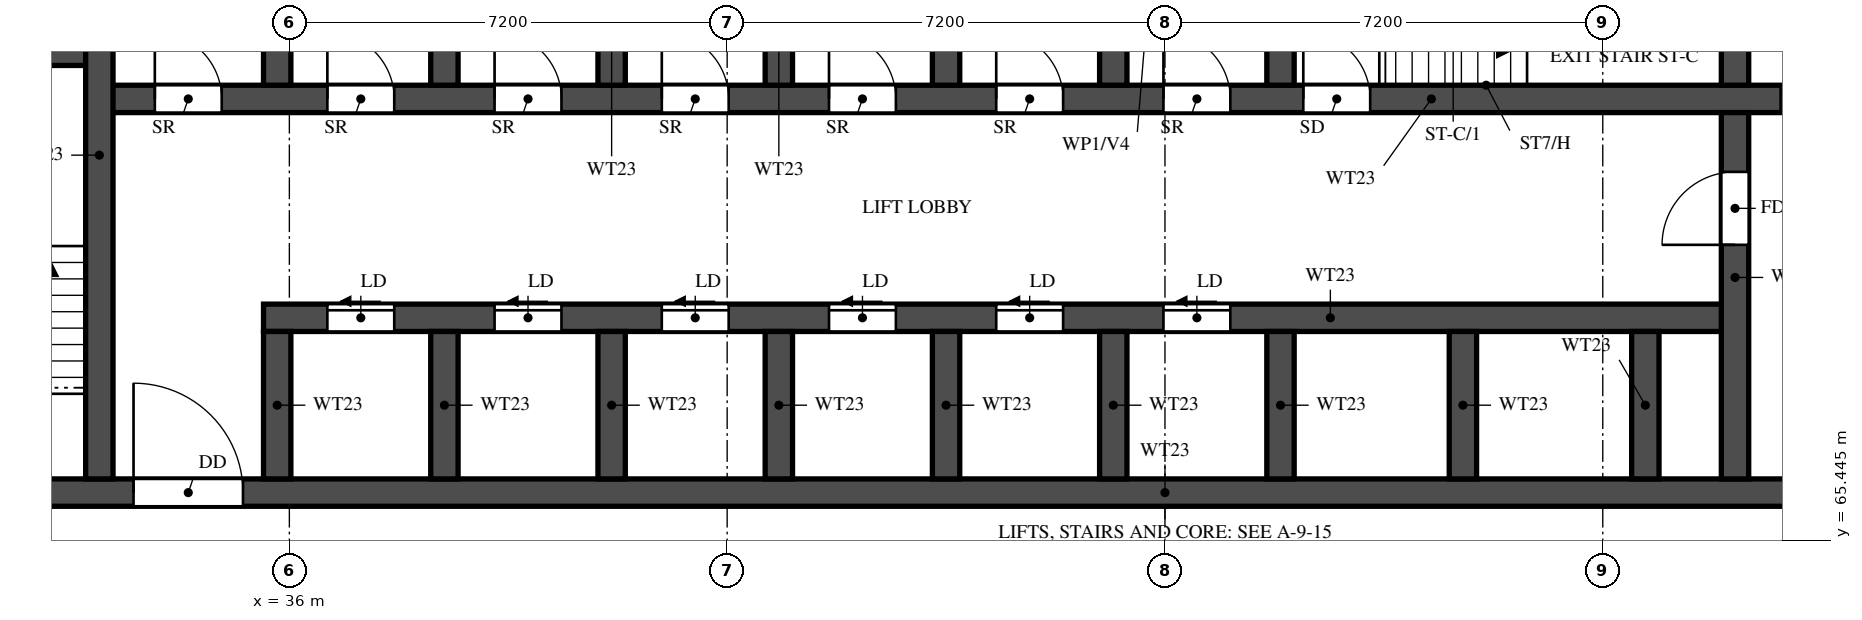
"""IFC4 building model, lengths in metres.
Left out: names, types, materials, properties, quantities, classifications, styles, units other than length and angle.
Written with IfcOpenShell. Run it as: python <this file> out.ifc"""

import sys

from ifc_helpers import new_model, si_unit, direction, frame, frame_2d, origin, place, context, subcontext, project, spatial, rectangle, extrude, element, fill, save


model = new_model("IFC4")
c1 = context("Model", 3, precision=1e-05, world=origin(), true_north=direction((0.0, 1.0)))
c2 = subcontext(c1, "Body", "Model", "MODEL_VIEW")
j1 = project(units=[si_unit("LENGTHUNIT", "METRE"), si_unit("PLANEANGLEUNIT", "RADIAN")], contexts=[c1])
p1 = place(None, origin())
s1 = spatial("IfcSite", under=j1, at=p1, CompositionType="ELEMENT")
p2 = place(p1, origin())
s2 = spatial("IfcBuilding", under=s1, at=p2, CompositionType="ELEMENT")
p3 = place(p2, frame((0.0, 0.0, 104.0)))
s3 = spatial("IfcBuildingStorey", under=s2, at=p3, CompositionType="ELEMENT", Elevation=104.0)
p4 = place(p3, frame((29.7, 66.225, 0.0), z_axis=(0.0, 0.0, 1.0), x_axis=(1.0, 0.0, 0.0)))
e1 = element("IfcWall", 1, at=p4, inside=s3, PredefinedType="SHEAR", context=c2, shape_type="SweptSolid", body=[
    extrude(rectangle(XDim=41.4, YDim=0.45, at=frame_2d((20.7, 0.0))), origin(), (0.0, 0.0, 1.0), 3.1),
])
p5 = place(p4, frame((0.925, 0.0, 0.0)))
e2 = element("IfcOpeningElement", 2, at=p5, cuts=e1, PredefinedType="OPENING", context=c2, shape_type="SweptSolid", body=[
    extrude(rectangle(XDim=1.1, YDim=2.1, at=frame_2d((0.55, 1.05))), frame((0.0, 0.235, 0.0), z_axis=(0.0, -1.0, 0.0), x_axis=(1.0, 0.0, 0.0)), (0.0, 0.0, 1.0), 0.47),
])
p6 = place(p4, frame((3.738, 0.0, 0.0)))
e3 = element("IfcOpeningElement", 3, at=p6, cuts=e1, PredefinedType="OPENING", context=c2, shape_type="SweptSolid", body=[
    extrude(rectangle(XDim=1.8, YDim=2.1, at=frame_2d((0.9, 1.05))), frame((0.0, 0.235, 0.0), z_axis=(0.0, -1.0, 0.0), x_axis=(1.0, 0.0, 0.0)), (0.0, 0.0, 1.0), 0.47),
])
p7 = place(p3, frame((35.575, 69.1, 0.0), z_axis=(0.0, 0.0, 1.0), x_axis=(1.0, 0.0, 0.0)))
e4 = element("IfcWall", 4, at=p7, inside=s3, PredefinedType="SHEAR", context=c2, shape_type="SweptSolid", body=[
    extrude(rectangle(XDim=24.2, YDim=0.45, at=frame_2d((12.1, 0.0))), origin(), (0.0, 0.0, 1.0), 3.1),
])
p8 = place(p7, frame((1.05, 0.0, 0.0)))
e5 = element("IfcOpeningElement", 5, at=p8, cuts=e4, PredefinedType="OPENING", context=c2, shape_type="SweptSolid", body=[
    extrude(rectangle(XDim=1.1, YDim=2.1, at=frame_2d((0.55, 1.05))), frame((0.0, 0.235, 0.0), z_axis=(0.0, -1.0, 0.0), x_axis=(1.0, 0.0, 0.0)), (0.0, 0.0, 1.0), 0.47),
])
p9 = place(p7, frame((3.8, 0.0, 0.0)))
e6 = element("IfcOpeningElement", 6, at=p9, cuts=e4, PredefinedType="OPENING", context=c2, shape_type="SweptSolid", body=[
    extrude(rectangle(XDim=1.1, YDim=2.1, at=frame_2d((0.55, 1.05))), frame((0.0, 0.235, 0.0), z_axis=(0.0, -1.0, 0.0), x_axis=(1.0, 0.0, 0.0)), (0.0, 0.0, 1.0), 0.47),
])
p10 = place(p7, frame((6.55, 0.0, 0.0)))
e7 = element("IfcOpeningElement", 7, at=p10, cuts=e4, PredefinedType="OPENING", context=c2, shape_type="SweptSolid", body=[
    extrude(rectangle(XDim=1.1, YDim=2.1, at=frame_2d((0.55, 1.05))), frame((0.0, 0.235, 0.0), z_axis=(0.0, -1.0, 0.0), x_axis=(1.0, 0.0, 0.0)), (0.0, 0.0, 1.0), 0.47),
])
p11 = place(p7, frame((9.3, 0.0, 0.0)))
e8 = element("IfcOpeningElement", 8, at=p11, cuts=e4, PredefinedType="OPENING", context=c2, shape_type="SweptSolid", body=[
    extrude(rectangle(XDim=1.1, YDim=2.1, at=frame_2d((0.55, 1.05))), frame((0.0, 0.235, 0.0), z_axis=(0.0, -1.0, 0.0), x_axis=(1.0, 0.0, 0.0)), (0.0, 0.0, 1.0), 0.47),
])
p12 = place(p7, frame((12.05, 0.0, 0.0)))
e9 = element("IfcOpeningElement", 9, at=p12, cuts=e4, PredefinedType="OPENING", context=c2, shape_type="SweptSolid", body=[
    extrude(rectangle(XDim=1.1, YDim=2.1, at=frame_2d((0.55, 1.05))), frame((0.0, 0.235, 0.0), z_axis=(0.0, -1.0, 0.0), x_axis=(1.0, 0.0, 0.0)), (0.0, 0.0, 1.0), 0.47),
])
p13 = place(p7, frame((14.8, 0.0, 0.0)))
e10 = element("IfcOpeningElement", 10, at=p13, cuts=e4, PredefinedType="OPENING", context=c2, shape_type="SweptSolid", body=[
    extrude(rectangle(XDim=1.1, YDim=2.1, at=frame_2d((0.55, 1.05))), frame((0.0, 0.235, 0.0), z_axis=(0.0, -1.0, 0.0), x_axis=(1.0, 0.0, 0.0)), (0.0, 0.0, 1.0), 0.47),
])
p14 = place(p3, frame((32.875, 72.7, 0.0), z_axis=(0.0, 0.0, 1.0), x_axis=(1.0, 0.0, 0.0)))
e11 = element("IfcWall", 11, at=p14, inside=s3, PredefinedType="SHEAR", context=c2, shape_type="SweptSolid", body=[
    extrude(rectangle(XDim=35.05, YDim=0.45, at=frame_2d((17.525, 0.0))), origin(), (0.0, 0.0, 1.0), 3.1),
])
p15 = place(p14, frame((19.8, 0.0, 0.0)))
e12 = element("IfcOpeningElement", 12, at=p15, cuts=e11, PredefinedType="OPENING", context=c2, shape_type="SweptSolid", body=[
    extrude(rectangle(XDim=1.1, YDim=2.1, at=frame_2d((0.55, 1.05))), frame((0.0, 0.235, 0.0), z_axis=(0.0, -1.0, 0.0), x_axis=(1.0, 0.0, 0.0)), (0.0, 0.0, 1.0), 0.47),
])
p16 = place(p14, frame((27.65, 0.0, 0.0)))
e13 = element("IfcOpeningElement", 13, at=p16, cuts=e11, PredefinedType="OPENING", context=c2, shape_type="SweptSolid", body=[
    extrude(rectangle(XDim=1.1, YDim=2.1, at=frame_2d((0.55, 1.05))), frame((0.0, 0.235, 0.0), z_axis=(0.0, -1.0, 0.0), x_axis=(1.0, 0.0, 0.0)), (0.0, 0.0, 1.0), 0.47),
])
p17 = place(p14, frame((30.25, 0.0, 0.0)))
e14 = element("IfcOpeningElement", 14, at=p17, cuts=e11, PredefinedType="OPENING", context=c2, shape_type="SweptSolid", body=[
    extrude(rectangle(XDim=1.1, YDim=2.1, at=frame_2d((0.55, 1.05))), frame((0.0, 0.235, 0.0), z_axis=(0.0, -1.0, 0.0), x_axis=(1.0, 0.0, 0.0)), (0.0, 0.0, 1.0), 0.47),
])
p18 = place(p14, frame((3.75, 0.0, 0.0)))
e15 = element("IfcOpeningElement", 15, at=p18, cuts=e11, PredefinedType="OPENING", context=c2, shape_type="SweptSolid", body=[
    extrude(rectangle(XDim=1.1, YDim=2.1, at=frame_2d((0.55, 1.05))), frame((0.0, 0.235, 0.0), z_axis=(0.0, -1.0, 0.0), x_axis=(1.0, 0.0, 0.0)), (0.0, 0.0, 1.0), 0.47),
])
p19 = place(p14, frame((6.5, 0.0, 0.0)))
e16 = element("IfcOpeningElement", 16, at=p19, cuts=e11, PredefinedType="OPENING", context=c2, shape_type="SweptSolid", body=[
    extrude(rectangle(XDim=1.1, YDim=2.1, at=frame_2d((0.55, 1.05))), frame((0.0, 0.235, 0.0), z_axis=(0.0, -1.0, 0.0), x_axis=(1.0, 0.0, 0.0)), (0.0, 0.0, 1.0), 0.47),
])
p20 = place(p14, frame((9.25, 0.0, 0.0)))
e17 = element("IfcOpeningElement", 17, at=p20, cuts=e11, PredefinedType="OPENING", context=c2, shape_type="SweptSolid", body=[
    extrude(rectangle(XDim=1.1, YDim=2.1, at=frame_2d((0.55, 1.05))), frame((0.0, 0.235, 0.0), z_axis=(0.0, -1.0, 0.0), x_axis=(1.0, 0.0, 0.0)), (0.0, 0.0, 1.0), 0.47),
])
p21 = place(p14, frame((12.0, 0.0, 0.0)))
e18 = element("IfcOpeningElement", 18, at=p21, cuts=e11, PredefinedType="OPENING", context=c2, shape_type="SweptSolid", body=[
    extrude(rectangle(XDim=1.1, YDim=2.1, at=frame_2d((0.55, 1.05))), frame((0.0, 0.235, 0.0), z_axis=(0.0, -1.0, 0.0), x_axis=(1.0, 0.0, 0.0)), (0.0, 0.0, 1.0), 0.47),
])
p22 = place(p14, frame((14.75, 0.0, 0.0)))
e19 = element("IfcOpeningElement", 19, at=p22, cuts=e11, PredefinedType="OPENING", context=c2, shape_type="SweptSolid", body=[
    extrude(rectangle(XDim=1.1, YDim=2.1, at=frame_2d((0.55, 1.05))), frame((0.0, 0.235, 0.0), z_axis=(0.0, -1.0, 0.0), x_axis=(1.0, 0.0, 0.0)), (0.0, 0.0, 1.0), 0.47),
])
p23 = place(p14, frame((17.5, 0.0, 0.0)))
e20 = element("IfcOpeningElement", 20, at=p23, cuts=e11, PredefinedType="OPENING", context=c2, shape_type="SweptSolid", body=[
    extrude(rectangle(XDim=1.1, YDim=2.1, at=frame_2d((0.55, 1.05))), frame((0.0, 0.235, 0.0), z_axis=(0.0, -1.0, 0.0), x_axis=(1.0, 0.0, 0.0)), (0.0, 0.0, 1.0), 0.47),
])
p24 = place(p14, frame((0.913, 0.0, 0.0)))
e21 = element("IfcOpeningElement", 21, at=p24, cuts=e11, PredefinedType="OPENING", context=c2, shape_type="SweptSolid", body=[
    extrude(rectangle(XDim=1.1, YDim=2.1, at=frame_2d((0.55, 1.05))), frame((0.0, 0.235, 0.0), z_axis=(0.0, -1.0, 0.0), x_axis=(1.0, 0.0, 0.0)), (0.0, 0.0, 1.0), 0.47),
])
p25 = place(p3, frame((29.7, 73.475, 0.0), z_axis=(0.0, 0.0, 1.0), x_axis=(1.0, 0.0, 0.0)))
e22 = element("IfcWall", 22, at=p25, inside=s3, PredefinedType="SHEAR", context=c2, shape_type="SweptSolid", body=[
    extrude(rectangle(XDim=3.175, YDim=0.45, at=frame_2d((1.587, 0.0))), origin(), (0.0, 0.0, 1.0), 3.1),
])
p26 = place(p3, frame((32.875, 66.45, 0.0), z_axis=(0.0, 0.0, 1.0), x_axis=(0.0, 1.0, 0.0)))
e23 = element("IfcWall", 23, at=p26, inside=s3, PredefinedType="SHEAR", context=c2, shape_type="SweptSolid", body=[
    extrude(rectangle(XDim=10.65, YDim=0.45, at=frame_2d((5.325, 0.0))), origin(), (0.0, 0.0, 1.0), 3.1),
])
p27 = place(p3, frame((59.775, 66.45, 0.0), z_axis=(0.0, 0.0, 1.0), x_axis=(0.0, 1.0, 0.0)))
e24 = element("IfcWall", 24, at=p27, inside=s3, PredefinedType="SHEAR", context=c2, shape_type="SweptSolid", body=[
    extrude(rectangle(XDim=6.025, YDim=0.45, at=frame_2d((3.013, 0.0))), origin(), (0.0, 0.0, 1.0), 3.1),
])
p28 = place(p27, frame((3.85, 0.0, 0.0)))
e25 = element("IfcOpeningElement", 25, at=p28, cuts=e24, PredefinedType="OPENING", context=c2, shape_type="SweptSolid", body=[
    extrude(rectangle(XDim=1.2, YDim=2.1, at=frame_2d((0.6, 1.05))), frame((0.0, 0.235, 0.0), z_axis=(0.0, -1.0, 0.0), x_axis=(1.0, 0.0, 0.0)), (0.0, 0.0, 1.0), 0.47),
])
p29 = place(p3, frame((59.775, 72.925, 0.0), z_axis=(0.0, 0.0, 1.0), x_axis=(0.0, 1.0, 0.0)))
e26 = element("IfcWall", 26, at=p29, inside=s3, PredefinedType="SHEAR", context=c2, shape_type="SweptSolid", body=[
    extrude(rectangle(XDim=2.95, YDim=0.45, at=frame_2d((1.475, 0.0))), origin(), (0.0, 0.0, 1.0), 3.1),
])
for number, where, z_axis, x_axis in (
    (27, (35.8, 66.45, 0.0), (0.0, 0.0, 1.0), (0.0, 1.0, 0.0)),
    (28, (38.55, 66.45, 0.0), (0.0, 0.0, 1.0), (0.0, 1.0, 0.0)),
    (29, (41.3, 66.45, 0.0), (0.0, 0.0, 1.0), (0.0, 1.0, 0.0)),
    (30, (44.05, 66.45, 0.0), (0.0, 0.0, 1.0), (0.0, 1.0, 0.0)),
    (31, (46.8, 66.45, 0.0), (0.0, 0.0, 1.0), (0.0, 1.0, 0.0)),
    (32, (49.55, 66.45, 0.0), (0.0, 0.0, 1.0), (0.0, 1.0, 0.0)),
    (33, (52.3, 66.45, 0.0), (0.0, 0.0, 1.0), (0.0, 1.0, 0.0)),
    (34, (55.3, 66.45, 0.0), (0.0, 0.0, 1.0), (0.0, 1.0, 0.0)),
    (35, (58.3, 66.45, 0.0), (0.0, 0.0, 1.0), (0.0, 1.0, 0.0)),
):
    element("IfcWall", number, at=place(p3, frame(where, z_axis=z_axis, x_axis=x_axis)), inside=s3, PredefinedType="SHEAR", context=c2, shape_type="SweptSolid", body=[
        extrude(rectangle(XDim=2.425, YDim=0.45, at=frame_2d((1.212, 0.0))), origin(), (0.0, 0.0, 1.0), 3.1),
    ])
for number, where, z_axis, x_axis in (
    (36, (35.8, 72.925, 0.0), (0.0, 0.0, 1.0), (0.0, 1.0, 0.0)),
    (37, (38.55, 72.925, 0.0), (0.0, 0.0, 1.0), (0.0, 1.0, 0.0)),
    (38, (41.3, 72.925, 0.0), (0.0, 0.0, 1.0), (0.0, 1.0, 0.0)),
    (39, (44.05, 72.925, 0.0), (0.0, 0.0, 1.0), (0.0, 1.0, 0.0)),
    (40, (46.8, 72.925, 0.0), (0.0, 0.0, 1.0), (0.0, 1.0, 0.0)),
    (41, (49.55, 72.925, 0.0), (0.0, 0.0, 1.0), (0.0, 1.0, 0.0)),
    (42, (52.3, 72.925, 0.0), (0.0, 0.0, 1.0), (0.0, 1.0, 0.0)),
):
    element("IfcWall", number, at=place(p3, frame(where, z_axis=z_axis, x_axis=x_axis)), inside=s3, PredefinedType="SHEAR", context=c2, shape_type="SweptSolid", body=[
        extrude(rectangle(XDim=2.95, YDim=0.45, at=frame_2d((1.475, 0.0))), origin(), (0.0, 0.0, 1.0), 3.1),
    ])
p30 = place(p15, origin())
e43 = element("IfcDoor", 43, at=p30, inside=s3, OperationType="SINGLE_SWING_LEFT", PredefinedType="DOOR", context=c2, shape_type="SweptSolid", body=[
    extrude(rectangle(XDim=1.1, YDim=2.1, at=frame_2d((0.55, 1.05))), frame((0.0, 0.025, 0.0), z_axis=(0.0, -1.0, 0.0), x_axis=(1.0, 0.0, 0.0)), (0.0, 0.0, 1.0), 0.05),
])
fill(e12, e43)
p31 = place(p6, origin())
e44 = element("IfcDoor", 44, at=p31, inside=s3, OperationType="DOUBLE_DOOR_SINGLE_SWING", PredefinedType="DOOR", context=c2, shape_type="SweptSolid", body=[
    extrude(rectangle(XDim=1.8, YDim=2.1, at=frame_2d((0.9, 1.05))), frame((0.0, 0.025, 0.0), z_axis=(0.0, -1.0, 0.0), x_axis=(1.0, 0.0, 0.0)), (0.0, 0.0, 1.0), 0.05),
])
fill(e3, e44)
p32 = place(p28, origin())
e45 = element("IfcDoor", 45, at=p32, inside=s3, OperationType="SINGLE_SWING_RIGHT", PredefinedType="DOOR", context=c2, shape_type="SweptSolid", body=[
    extrude(rectangle(XDim=1.2, YDim=2.1, at=frame_2d((0.6, 1.05))), frame((0.0, 0.025, 0.0), z_axis=(0.0, -1.0, 0.0), x_axis=(1.0, 0.0, 0.0)), (0.0, 0.0, 1.0), 0.05),
])
fill(e25, e45)
p33 = place(p16, origin())
e46 = element("IfcDoor", 46, at=p33, inside=s3, OperationType="SLIDING_TO_LEFT", PredefinedType="DOOR", context=c2, shape_type="SweptSolid", body=[
    extrude(rectangle(XDim=1.1, YDim=2.1, at=frame_2d((0.55, 1.05))), frame((0.0, 0.025, 0.0), z_axis=(0.0, -1.0, 0.0), x_axis=(1.0, 0.0, 0.0)), (0.0, 0.0, 1.0), 0.05),
])
fill(e13, e46)
p34 = place(p8, origin())
e47 = element("IfcDoor", 47, at=p34, inside=s3, OperationType="SLIDING_TO_LEFT", PredefinedType="DOOR", context=c2, shape_type="SweptSolid", body=[
    extrude(rectangle(XDim=1.1, YDim=2.1, at=frame_2d((0.55, 1.05))), frame((0.0, 0.025, 0.0), z_axis=(0.0, -1.0, 0.0), x_axis=(1.0, 0.0, 0.0)), (0.0, 0.0, 1.0), 0.05),
])
fill(e5, e47)
p35 = place(p9, origin())
e48 = element("IfcDoor", 48, at=p35, inside=s3, OperationType="SLIDING_TO_LEFT", PredefinedType="DOOR", context=c2, shape_type="SweptSolid", body=[
    extrude(rectangle(XDim=1.1, YDim=2.1, at=frame_2d((0.55, 1.05))), frame((0.0, 0.025, 0.0), z_axis=(0.0, -1.0, 0.0), x_axis=(1.0, 0.0, 0.0)), (0.0, 0.0, 1.0), 0.05),
])
fill(e6, e48)
p36 = place(p10, origin())
e49 = element("IfcDoor", 49, at=p36, inside=s3, OperationType="SLIDING_TO_LEFT", PredefinedType="DOOR", context=c2, shape_type="SweptSolid", body=[
    extrude(rectangle(XDim=1.1, YDim=2.1, at=frame_2d((0.55, 1.05))), frame((0.0, 0.025, 0.0), z_axis=(0.0, -1.0, 0.0), x_axis=(1.0, 0.0, 0.0)), (0.0, 0.0, 1.0), 0.05),
])
fill(e7, e49)
p37 = place(p11, origin())
e50 = element("IfcDoor", 50, at=p37, inside=s3, OperationType="SLIDING_TO_LEFT", PredefinedType="DOOR", context=c2, shape_type="SweptSolid", body=[
    extrude(rectangle(XDim=1.1, YDim=2.1, at=frame_2d((0.55, 1.05))), frame((0.0, 0.025, 0.0), z_axis=(0.0, -1.0, 0.0), x_axis=(1.0, 0.0, 0.0)), (0.0, 0.0, 1.0), 0.05),
])
fill(e8, e50)
p38 = place(p12, origin())
e51 = element("IfcDoor", 51, at=p38, inside=s3, OperationType="SLIDING_TO_LEFT", PredefinedType="DOOR", context=c2, shape_type="SweptSolid", body=[
    extrude(rectangle(XDim=1.1, YDim=2.1, at=frame_2d((0.55, 1.05))), frame((0.0, 0.025, 0.0), z_axis=(0.0, -1.0, 0.0), x_axis=(1.0, 0.0, 0.0)), (0.0, 0.0, 1.0), 0.05),
])
fill(e9, e51)
p39 = place(p13, origin())
e52 = element("IfcDoor", 52, at=p39, inside=s3, OperationType="SLIDING_TO_LEFT", PredefinedType="DOOR", context=c2, shape_type="SweptSolid", body=[
    extrude(rectangle(XDim=1.1, YDim=2.1, at=frame_2d((0.55, 1.05))), frame((0.0, 0.025, 0.0), z_axis=(0.0, -1.0, 0.0), x_axis=(1.0, 0.0, 0.0)), (0.0, 0.0, 1.0), 0.05),
])
fill(e10, e52)
p40 = place(p18, origin())
e53 = element("IfcDoor", 53, at=p40, inside=s3, OperationType="SINGLE_SWING_LEFT", PredefinedType="DOOR", context=c2, shape_type="SweptSolid", body=[
    extrude(rectangle(XDim=1.1, YDim=2.1, at=frame_2d((0.55, 1.05))), frame((0.0, 0.025, 0.0), z_axis=(0.0, -1.0, 0.0), x_axis=(1.0, 0.0, 0.0)), (0.0, 0.0, 1.0), 0.05),
])
fill(e15, e53)
p41 = place(p19, origin())
e54 = element("IfcDoor", 54, at=p41, inside=s3, OperationType="SINGLE_SWING_LEFT", PredefinedType="DOOR", context=c2, shape_type="SweptSolid", body=[
    extrude(rectangle(XDim=1.1, YDim=2.1, at=frame_2d((0.55, 1.05))), frame((0.0, 0.025, 0.0), z_axis=(0.0, -1.0, 0.0), x_axis=(1.0, 0.0, 0.0)), (0.0, 0.0, 1.0), 0.05),
])
fill(e16, e54)
p42 = place(p20, origin())
e55 = element("IfcDoor", 55, at=p42, inside=s3, OperationType="SINGLE_SWING_LEFT", PredefinedType="DOOR", context=c2, shape_type="SweptSolid", body=[
    extrude(rectangle(XDim=1.1, YDim=2.1, at=frame_2d((0.55, 1.05))), frame((0.0, 0.025, 0.0), z_axis=(0.0, -1.0, 0.0), x_axis=(1.0, 0.0, 0.0)), (0.0, 0.0, 1.0), 0.05),
])
fill(e17, e55)
p43 = place(p21, origin())
e56 = element("IfcDoor", 56, at=p43, inside=s3, OperationType="SINGLE_SWING_LEFT", PredefinedType="DOOR", context=c2, shape_type="SweptSolid", body=[
    extrude(rectangle(XDim=1.1, YDim=2.1, at=frame_2d((0.55, 1.05))), frame((0.0, 0.025, 0.0), z_axis=(0.0, -1.0, 0.0), x_axis=(1.0, 0.0, 0.0)), (0.0, 0.0, 1.0), 0.05),
])
fill(e18, e56)
p44 = place(p22, origin())
e57 = element("IfcDoor", 57, at=p44, inside=s3, OperationType="SINGLE_SWING_LEFT", PredefinedType="DOOR", context=c2, shape_type="SweptSolid", body=[
    extrude(rectangle(XDim=1.1, YDim=2.1, at=frame_2d((0.55, 1.05))), frame((0.0, 0.025, 0.0), z_axis=(0.0, -1.0, 0.0), x_axis=(1.0, 0.0, 0.0)), (0.0, 0.0, 1.0), 0.05),
])
fill(e19, e57)
p45 = place(p23, origin())
e58 = element("IfcDoor", 58, at=p45, inside=s3, OperationType="SINGLE_SWING_LEFT", PredefinedType="DOOR", context=c2, shape_type="SweptSolid", body=[
    extrude(rectangle(XDim=1.1, YDim=2.1, at=frame_2d((0.55, 1.05))), frame((0.0, 0.025, 0.0), z_axis=(0.0, -1.0, 0.0), x_axis=(1.0, 0.0, 0.0)), (0.0, 0.0, 1.0), 0.05),
])
fill(e20, e58)
p46 = place(p24, origin())
e59 = element("IfcDoor", 59, at=p46, inside=s3, OperationType="SINGLE_SWING_LEFT", PredefinedType="DOOR", context=c2, shape_type="SweptSolid", body=[
    extrude(rectangle(XDim=1.1, YDim=2.1, at=frame_2d((0.55, 1.05))), frame((0.0, 0.025, 0.0), z_axis=(0.0, -1.0, 0.0), x_axis=(1.0, 0.0, 0.0)), (0.0, 0.0, 1.0), 0.05),
])
fill(e21, e59)
save(model, sys.argv[1])
